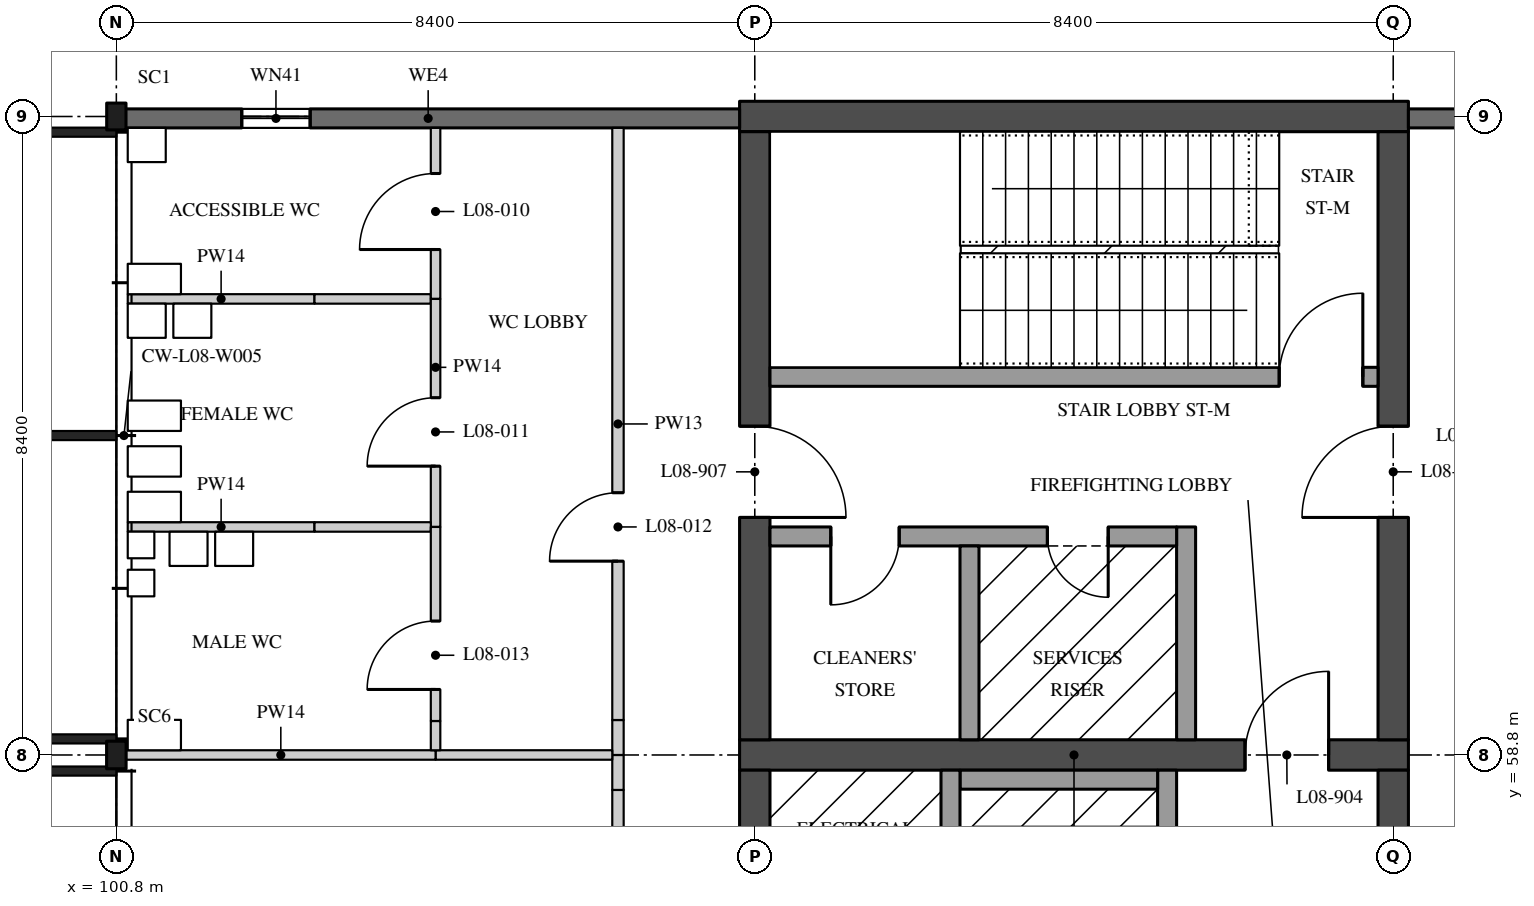
"""IFC4 building model, lengths in metres.
Left out: names, types, materials, properties, quantities, classifications, styles, units other than length and angle.
Written with IfcOpenShell. Run it as: python <this file> out.ifc"""

import sys

from ifc_helpers import new_model, si_unit, direction, frame, frame_2d, origin, origin_2d, place, context, subcontext, project, spatial, rectangle, i_section, extrude, element, fill, save


model = new_model("IFC4")
c1 = context("Model", 3, precision=1e-05, world=origin(), true_north=direction((0.0, 1.0)))
c2 = subcontext(c1, "Body", "Model", "MODEL_VIEW")
j1 = project(units=[si_unit("LENGTHUNIT", "METRE"), si_unit("PLANEANGLEUNIT", "RADIAN")], contexts=[c1])
p1 = place(None, origin())
s1 = spatial("IfcSite", under=j1, at=p1, CompositionType="ELEMENT")
p2 = place(p1, origin())
s2 = spatial("IfcBuilding", under=s1, at=p2, CompositionType="ELEMENT")
p3 = place(p2, frame((0.0, 0.0, 36.9)))
s3 = spatial("IfcBuildingStorey", under=s2, at=p3, CompositionType="ELEMENT", Elevation=36.9)
p4 = place(p3, frame((100.8, 58.8, 0.0), z_axis=(0.0, 0.0, 1.0), x_axis=(1.0, 0.0, 0.0)))
e1 = element("IfcColumn", 1, at=p4, inside=s3, PredefinedType="COLUMN", context=c2, shape_type="SweptSolid", body=[
    extrude(i_section(OverallWidth=0.257, OverallDepth=0.363, WebThickness=0.013, FlangeThickness=0.022, FilletRadius=0.015, at=origin_2d()), origin(), (0.0, 0.0, 1.0), 4.37),
])
p5 = place(p3, frame((100.8, 67.2, 0.0), z_axis=(0.0, 0.0, 1.0), x_axis=(1.0, 0.0, 0.0)))
e2 = element("IfcColumn", 2, at=p5, inside=s3, PredefinedType="COLUMN", context=c2, shape_type="SweptSolid", body=[
    extrude(i_section(OverallWidth=0.254, OverallDepth=0.353, WebThickness=0.01, FlangeThickness=0.016, FilletRadius=0.015, at=origin_2d()), origin(), (0.0, 0.0, 1.0), 4.37),
])
p6 = place(p3, frame((109.0, 58.8, 0.0), z_axis=(0.0, 0.0, 1.0), x_axis=(1.0, 0.0, 0.0)))
e3 = element("IfcWall", 3, at=p6, inside=s3, PredefinedType="SHEAR", context=c2, shape_type="SweptSolid", body=[
    extrude(rectangle(XDim=8.8, YDim=0.4, at=frame_2d((4.4, 0.0))), origin(), (0.0, 0.0, 1.0), 4.37),
])
p7 = place(p6, frame((6.65, 0.0, 0.0)))
e4 = element("IfcOpeningElement", 4, at=p7, cuts=e3, PredefinedType="OPENING", context=c2, shape_type="SweptSolid", body=[
    extrude(rectangle(XDim=1.1, YDim=2.1, at=frame_2d((0.55, 1.05))), frame((0.0, 0.21, 0.0), z_axis=(0.0, -1.0, 0.0), x_axis=(1.0, 0.0, 0.0)), (0.0, 0.0, 1.0), 0.42),
])
p8 = place(p3, frame((109.2, 50.6, 0.0), z_axis=(0.0, 0.0, 1.0), x_axis=(0.0, 1.0, 0.0)))
e5 = element("IfcWall", 5, at=p8, inside=s3, PredefinedType="SHEAR", context=c2, shape_type="SweptSolid", body=[
    extrude(rectangle(XDim=8.0, YDim=0.4, at=frame_2d((4.0, 0.0))), origin(), (0.0, 0.0, 1.0), 4.37),
])
p9 = place(p8, frame((3.25, 0.0, 0.0)))
e6 = element("IfcOpeningElement", 6, at=p9, cuts=e5, PredefinedType="OPENING", context=c2, shape_type="SweptSolid", body=[
    extrude(rectangle(XDim=1.2, YDim=2.1, at=frame_2d((0.6, 1.05))), frame((0.0, 0.21, 0.0), z_axis=(0.0, -1.0, 0.0), x_axis=(1.0, 0.0, 0.0)), (0.0, 0.0, 1.0), 0.42),
])
p10 = place(p3, frame((117.6, 50.6, 0.0), z_axis=(0.0, 0.0, 1.0), x_axis=(0.0, 1.0, 0.0)))
e7 = element("IfcWall", 7, at=p10, inside=s3, PredefinedType="SHEAR", context=c2, shape_type="SweptSolid", body=[
    extrude(rectangle(XDim=8.0, YDim=0.4, at=frame_2d((4.0, 0.0))), origin(), (0.0, 0.0, 1.0), 4.37),
])
p11 = place(p10, frame((3.25, 0.0, 0.0)))
e8 = element("IfcOpeningElement", 8, at=p11, cuts=e7, PredefinedType="OPENING", context=c2, shape_type="SweptSolid", body=[
    extrude(rectangle(XDim=1.2, YDim=2.1, at=frame_2d((0.6, 1.05))), frame((0.0, 0.21, 0.0), z_axis=(0.0, -1.0, 0.0), x_axis=(1.0, 0.0, 0.0)), (0.0, 0.0, 1.0), 0.42),
])
p12 = place(p10, frame((6.0, 0.0, 0.0)))
e9 = element("IfcOpeningElement", 9, at=p12, cuts=e7, PredefinedType="OPENING", context=c2, shape_type="SweptSolid", body=[
    extrude(rectangle(XDim=1.2, YDim=2.1, at=frame_2d((0.6, 1.05))), frame((0.0, 0.21, 0.0), z_axis=(0.0, -1.0, 0.0), x_axis=(1.0, 0.0, 0.0)), (0.0, 0.0, 1.0), 0.42),
])
p13 = place(p3, frame((109.0, 67.2, 0.0), z_axis=(0.0, 0.0, 1.0), x_axis=(1.0, 0.0, 0.0)))
e10 = element("IfcWall", 10, at=p13, inside=s3, PredefinedType="SHEAR", context=c2, shape_type="SweptSolid", body=[
    extrude(rectangle(XDim=8.8, YDim=0.4, at=frame_2d((4.4, 0.0))), origin(), (0.0, 0.0, 1.0), 4.37),
])
p14 = place(p3, frame((109.2, 59.0, 0.0), z_axis=(0.0, 0.0, 1.0), x_axis=(0.0, 1.0, 0.0)))
e11 = element("IfcWall", 11, at=p14, inside=s3, PredefinedType="SHEAR", context=c2, shape_type="SweptSolid", body=[
    extrude(rectangle(XDim=8.0, YDim=0.4, at=frame_2d((4.0, 0.0))), origin(), (0.0, 0.0, 1.0), 4.37),
])
p15 = place(p14, frame((2.925, 0.0, 0.0)))
e12 = element("IfcOpeningElement", 12, at=p15, cuts=e11, PredefinedType="OPENING", context=c2, shape_type="SweptSolid", body=[
    extrude(rectangle(XDim=1.2, YDim=2.1, at=frame_2d((0.6, 1.05))), frame((0.0, 0.21, 0.0), z_axis=(0.0, -1.0, 0.0), x_axis=(1.0, 0.0, 0.0)), (0.0, 0.0, 1.0), 0.42),
])
p16 = place(p3, frame((117.6, 59.0, 0.0), z_axis=(0.0, 0.0, 1.0), x_axis=(0.0, 1.0, 0.0)))
e13 = element("IfcWall", 13, at=p16, inside=s3, PredefinedType="SHEAR", context=c2, shape_type="SweptSolid", body=[
    extrude(rectangle(XDim=8.0, YDim=0.4, at=frame_2d((4.0, 0.0))), origin(), (0.0, 0.0, 1.0), 4.37),
])
p17 = place(p16, frame((2.925, 0.0, 0.0)))
e14 = element("IfcOpeningElement", 14, at=p17, cuts=e13, PredefinedType="OPENING", context=c2, shape_type="SweptSolid", body=[
    extrude(rectangle(XDim=1.2, YDim=2.1, at=frame_2d((0.6, 1.05))), frame((0.0, 0.21, 0.0), z_axis=(0.0, -1.0, 0.0), x_axis=(1.0, 0.0, 0.0)), (0.0, 0.0, 1.0), 0.42),
])
p18 = place(p3, frame((117.4, 63.775, 0.0), z_axis=(0.0, 0.0, 1.0), x_axis=(-1.0, 0.0, 0.0)))
e15 = element("IfcWall", 15, at=p18, inside=s3, PredefinedType="SOLIDWALL", context=c2, shape_type="SweptSolid", body=[
    extrude(rectangle(XDim=8.0, YDim=0.25, at=frame_2d((4.0, 0.0))), origin(), (0.0, 0.0, 1.0), 4.37),
])
p19 = place(p18, frame((0.2, 0.0, 0.0)))
e16 = element("IfcOpeningElement", 16, at=p19, cuts=e15, PredefinedType="OPENING", context=c2, shape_type="SweptSolid", body=[
    extrude(rectangle(XDim=1.1, YDim=2.1, at=frame_2d((0.55, 1.05))), frame((0.0, 0.135, 0.0), z_axis=(0.0, -1.0, 0.0), x_axis=(1.0, 0.0, 0.0)), (0.0, 0.0, 1.0), 0.27),
])
p20 = place(p3, frame((114.875, 61.8, 0.0), z_axis=(0.0, 0.0, 1.0), x_axis=(0.0, -1.0, 0.0)))
e17 = element("IfcWall", 17, at=p20, inside=s3, PredefinedType="SOLIDWALL", context=c2, shape_type="SweptSolid", body=[
    extrude(rectangle(XDim=2.8, YDim=0.25, at=frame_2d((1.4, 0.0))), origin(), (0.0, 0.0, 1.0), 4.37),
])
p21 = place(p3, frame((114.75, 61.675, 0.0), z_axis=(0.0, 0.0, 1.0), x_axis=(-1.0, 0.0, 0.0)))
e18 = element("IfcWall", 18, at=p21, inside=s3, PredefinedType="SOLIDWALL", context=c2, shape_type="SweptSolid", body=[
    extrude(rectangle(XDim=5.35, YDim=0.25, at=frame_2d((2.675, 0.0))), origin(), (0.0, 0.0, 1.0), 4.37),
])
p22 = place(p21, frame((3.65, 0.0, 0.0)))
e19 = element("IfcOpeningElement", 19, at=p22, cuts=e18, PredefinedType="OPENING", context=c2, shape_type="SweptSolid", body=[
    extrude(rectangle(XDim=0.9, YDim=2.1, at=frame_2d((0.45, 1.05))), frame((0.0, 0.135, 0.0), z_axis=(0.0, -1.0, 0.0), x_axis=(1.0, 0.0, 0.0)), (0.0, 0.0, 1.0), 0.27),
])
p23 = place(p21, frame((0.9, 0.0, 0.0)))
e20 = element("IfcOpeningElement", 20, at=p23, cuts=e18, PredefinedType="OPENING", context=c2, shape_type="SweptSolid", body=[
    extrude(rectangle(XDim=0.8, YDim=2.1, at=frame_2d((0.4, 1.05))), frame((0.0, 0.135, 0.0), z_axis=(0.0, -1.0, 0.0), x_axis=(1.0, 0.0, 0.0)), (0.0, 0.0, 1.0), 0.27),
])
p24 = place(p3, frame((112.025, 61.55, 0.0), z_axis=(0.0, 0.0, 1.0), x_axis=(0.0, -1.0, 0.0)))
e21 = element("IfcWall", 21, at=p24, inside=s3, PredefinedType="SOLIDWALL", context=c2, shape_type="SweptSolid", body=[
    extrude(rectangle(XDim=2.55, YDim=0.25, at=frame_2d((1.275, 0.0))), origin(), (0.0, 0.0, 1.0), 4.37),
])
p25 = place(p3, frame((114.625, 55.5, 0.0), z_axis=(0.0, 0.0, 1.0), x_axis=(0.0, 1.0, 0.0)))
e22 = element("IfcWall", 22, at=p25, inside=s3, PredefinedType="SOLIDWALL", context=c2, shape_type="SweptSolid", body=[
    extrude(rectangle(XDim=3.1, YDim=0.25, at=frame_2d((1.55, 0.0))), origin(), (0.0, 0.0, 1.0), 4.37),
])
p26 = place(p25, frame((1.0, 0.0, 0.0)))
e23 = element("IfcOpeningElement", 23, at=p26, cuts=e22, PredefinedType="OPENING", context=c2, shape_type="SweptSolid", body=[
    extrude(rectangle(XDim=1.1, YDim=2.1, at=frame_2d((0.55, 1.05))), frame((0.0, 0.135, 0.0), z_axis=(0.0, -1.0, 0.0), x_axis=(1.0, 0.0, 0.0)), (0.0, 0.0, 1.0), 0.27),
])
p27 = place(p3, frame((111.9, 58.475, 0.0), z_axis=(0.0, 0.0, 1.0), x_axis=(1.0, 0.0, 0.0)))
e24 = element("IfcWall", 24, at=p27, inside=s3, PredefinedType="SOLIDWALL", context=c2, shape_type="SweptSolid", body=[
    extrude(rectangle(XDim=2.6, YDim=0.25, at=frame_2d((1.3, 0.0))), origin(), (0.0, 0.0, 1.0), 4.37),
])
p28 = place(p3, frame((111.775, 55.5, 0.0), z_axis=(0.0, 0.0, 1.0), x_axis=(0.0, 1.0, 0.0)))
e25 = element("IfcWall", 25, at=p28, inside=s3, PredefinedType="SOLIDWALL", context=c2, shape_type="SweptSolid", body=[
    extrude(rectangle(XDim=3.1, YDim=0.25, at=frame_2d((1.55, 0.0))), origin(), (0.0, 0.0, 1.0), 4.37),
])
p29 = place(p3, frame((107.4, 50.86, 0.0), z_axis=(0.0, 0.0, 1.0), x_axis=(0.0, 1.0, 0.0)))
e26 = element("IfcWall", 26, at=p29, inside=s3, PredefinedType="PARTITIONING", context=c2, shape_type="SweptSolid", body=[
    extrude(rectangle(XDim=7.48, YDim=0.15, at=frame_2d((3.74, 0.0))), origin(), (0.0, 0.0, 1.0), 4.37),
])
p30 = place(p29, frame((3.29, 0.0, 0.0)))
e27 = element("IfcOpeningElement", 27, at=p30, cuts=e26, PredefinedType="OPENING", context=c2, shape_type="SweptSolid", body=[
    extrude(rectangle(XDim=0.9, YDim=2.1, at=frame_2d((0.45, 1.05))), frame((0.0, 0.085, 0.0), z_axis=(0.0, -1.0, 0.0), x_axis=(1.0, 0.0, 0.0)), (0.0, 0.0, 1.0), 0.17),
])
for number, where, z_axis, x_axis in (
    (28, (107.4, 58.34, 0.0), (0.0, 0.0, 1.0), (0.0, 1.0, 0.0)),
    (29, (107.4, 58.8, 0.0), (0.0, 0.0, 1.0), (0.0, 1.0, 0.0)),
):
    element("IfcWall", number, at=place(p3, frame(where, z_axis=z_axis, x_axis=x_axis)), inside=s3, PredefinedType="PARTITIONING", context=c2, shape_type="SweptSolid", body=[
        extrude(rectangle(XDim=0.46, YDim=0.15, at=frame_2d((0.23, 0.0))), origin(), (0.0, 0.0, 1.0), 3.817),
    ])
p31 = place(p3, frame((107.4, 59.26, 0.0), z_axis=(0.0, 0.0, 1.0), x_axis=(0.0, 1.0, 0.0)))
e30 = element("IfcWall", 30, at=p31, inside=s3, PredefinedType="PARTITIONING", context=c2, shape_type="SweptSolid", body=[
    extrude(rectangle(XDim=7.79, YDim=0.15, at=frame_2d((3.895, 0.0))), origin(), (0.0, 0.0, 1.0), 4.37),
])
p32 = place(p31, frame((2.09, 0.0, 0.0)))
e31 = element("IfcOpeningElement", 31, at=p32, cuts=e30, PredefinedType="OPENING", context=c2, shape_type="SweptSolid", body=[
    extrude(rectangle(XDim=0.9, YDim=2.1, at=frame_2d((0.45, 1.05))), frame((0.0, 0.085, 0.0), z_axis=(0.0, -1.0, 0.0), x_axis=(1.0, 0.0, 0.0)), (0.0, 0.0, 1.0), 0.17),
])
p33 = place(p3, frame((105.0, 58.8, 0.0), z_axis=(0.0, 0.0, 1.0), x_axis=(1.0, 0.0, 0.0)))
e32 = element("IfcWall", 32, at=p33, inside=s3, PredefinedType="PARTITIONING", context=c2, shape_type="SweptSolid", body=[
    extrude(rectangle(XDim=2.325, YDim=0.125, at=frame_2d((1.163, 0.0))), origin(), (0.0, 0.0, 1.0), 3.817),
])
p34 = place(p3, frame((100.928, 58.8, 0.0), z_axis=(0.0, 0.0, 1.0), x_axis=(1.0, 0.0, 0.0)))
e33 = element("IfcWall", 33, at=p34, inside=s3, PredefinedType="PARTITIONING", context=c2, shape_type="SweptSolid", body=[
    extrude(rectangle(XDim=4.072, YDim=0.125, at=frame_2d((2.036, 0.0))), origin(), (0.0, 0.0, 1.0), 3.817),
])
p35 = place(p3, frame((100.95, 64.8, 0.0), z_axis=(0.0, 0.0, 1.0), x_axis=(1.0, 0.0, 0.0)))
e34 = element("IfcWall", 34, at=p35, inside=s3, PredefinedType="PARTITIONING", context=c2, shape_type="SweptSolid", body=[
    extrude(rectangle(XDim=2.457, YDim=0.125, at=frame_2d((1.229, 0.0))), origin(), (0.0, 0.0, 1.0), 4.37),
])
p36 = place(p3, frame((103.407, 64.8, 0.0), z_axis=(0.0, 0.0, 1.0), x_axis=(1.0, 0.0, 0.0)))
e35 = element("IfcWall", 35, at=p36, inside=s3, PredefinedType="PARTITIONING", context=c2, shape_type="SweptSolid", body=[
    extrude(rectangle(XDim=1.531, YDim=0.125, at=frame_2d((0.766, 0.0))), origin(), (0.0, 0.0, 1.0), 3.946),
])
p37 = place(p3, frame((105.0, 64.8, 0.0), z_axis=(0.0, 0.0, 1.0), x_axis=(0.0, 1.0, 0.0)))
e36 = element("IfcWall", 36, at=p37, inside=s3, PredefinedType="PARTITIONING", context=c2, shape_type="SweptSolid", body=[
    extrude(rectangle(XDim=2.25, YDim=0.125, at=frame_2d((1.125, 0.0))), origin(), (0.0, 0.0, 1.0), 4.37),
])
p38 = place(p37, frame((0.65, 0.0, 0.0)))
e37 = element("IfcOpeningElement", 37, at=p38, cuts=e36, PredefinedType="OPENING", context=c2, shape_type="SweptSolid", body=[
    extrude(rectangle(XDim=1.0, YDim=2.1, at=frame_2d((0.5, 1.05))), frame((0.0, 0.073, 0.0), z_axis=(0.0, -1.0, 0.0), x_axis=(1.0, 0.0, 0.0)), (0.0, 0.0, 1.0), 0.145),
])
p39 = place(p3, frame((105.0, 61.8, 0.0), z_axis=(0.0, 0.0, 1.0), x_axis=(0.0, 1.0, 0.0)))
e38 = element("IfcWall", 38, at=p39, inside=s3, PredefinedType="PARTITIONING", context=c2, shape_type="SweptSolid", body=[
    extrude(rectangle(XDim=3.0, YDim=0.125, at=frame_2d((1.5, 0.0))), origin(), (0.0, 0.0, 1.0), 4.37),
])
p40 = place(p39, frame((0.8, 0.0, 0.0)))
e39 = element("IfcOpeningElement", 39, at=p40, cuts=e38, PredefinedType="OPENING", context=c2, shape_type="SweptSolid", body=[
    extrude(rectangle(XDim=0.9, YDim=2.1, at=frame_2d((0.45, 1.05))), frame((0.0, 0.073, 0.0), z_axis=(0.0, -1.0, 0.0), x_axis=(1.0, 0.0, 0.0)), (0.0, 0.0, 1.0), 0.145),
])
p41 = place(p3, frame((100.95, 61.8, 0.0), z_axis=(0.0, 0.0, 1.0), x_axis=(1.0, 0.0, 0.0)))
e40 = element("IfcWall", 40, at=p41, inside=s3, PredefinedType="PARTITIONING", context=c2, shape_type="SweptSolid", body=[
    extrude(rectangle(XDim=2.457, YDim=0.125, at=frame_2d((1.229, 0.0))), origin(), (0.0, 0.0, 1.0), 4.37),
])
p42 = place(p3, frame((103.407, 61.8, 0.0), z_axis=(0.0, 0.0, 1.0), x_axis=(1.0, 0.0, 0.0)))
e41 = element("IfcWall", 41, at=p42, inside=s3, PredefinedType="PARTITIONING", context=c2, shape_type="SweptSolid", body=[
    extrude(rectangle(XDim=1.531, YDim=0.125, at=frame_2d((0.766, 0.0))), origin(), (0.0, 0.0, 1.0), 3.946),
])
p43 = place(p3, frame((105.0, 58.862, 0.0), z_axis=(0.0, 0.0, 1.0), x_axis=(0.0, 1.0, 0.0)))
e42 = element("IfcWall", 42, at=p43, inside=s3, PredefinedType="PARTITIONING", context=c2, shape_type="SweptSolid", body=[
    extrude(rectangle(XDim=0.385, YDim=0.125, at=frame_2d((0.192, 0.0))), origin(), (0.0, 0.0, 1.0), 3.817),
])
p44 = place(p3, frame((105.0, 59.247, 0.0), z_axis=(0.0, 0.0, 1.0), x_axis=(0.0, 1.0, 0.0)))
e43 = element("IfcWall", 43, at=p44, inside=s3, PredefinedType="PARTITIONING", context=c2, shape_type="SweptSolid", body=[
    extrude(rectangle(XDim=2.553, YDim=0.125, at=frame_2d((1.276, 0.0))), origin(), (0.0, 0.0, 1.0), 4.37),
])
p45 = place(p44, frame((0.415, 0.0, 0.0)))
e44 = element("IfcOpeningElement", 44, at=p45, cuts=e43, PredefinedType="OPENING", context=c2, shape_type="SweptSolid", body=[
    extrude(rectangle(XDim=0.9, YDim=2.1, at=frame_2d((0.45, 1.05))), frame((0.0, 0.073, 0.0), z_axis=(0.0, -1.0, 0.0), x_axis=(1.0, 0.0, 0.0)), (0.0, 0.0, 1.0), 0.145),
])
p46 = place(p3, frame((125.995, 67.175, 0.0), z_axis=(0.0, 0.0, 1.0), x_axis=(-1.0, 0.0, 0.0)))
e45 = element("IfcWall", 45, at=p46, inside=s3, PredefinedType="SOLIDWALL", context=c2, shape_type="SweptSolid", body=[
    extrude(rectangle(XDim=8.195, YDim=0.25, at=frame_2d((4.097, 0.0))), origin(), (0.0, 0.0, 1.0), 3.819),
])
p47 = place(p46, frame((1.195, 0.0, 0.6)))
e46 = element("IfcOpeningElement", 46, at=p47, cuts=e45, PredefinedType="OPENING", context=c2, shape_type="SweptSolid", body=[
    extrude(rectangle(XDim=1.8, YDim=2.7, at=frame_2d((0.9, 1.35))), frame((0.0, 0.135, 0.0), z_axis=(0.0, -1.0, 0.0), x_axis=(1.0, 0.0, 0.0)), (0.0, 0.0, 1.0), 0.27),
])
p48 = place(p3, frame((109.0, 67.175, 0.0), z_axis=(0.0, 0.0, 1.0), x_axis=(-1.0, 0.0, 0.0)))
e47 = element("IfcWall", 47, at=p48, inside=s3, PredefinedType="SOLIDWALL", context=c2, shape_type="SweptSolid", body=[
    extrude(rectangle(XDim=8.195, YDim=0.25, at=frame_2d((4.097, 0.0))), origin(), (0.0, 0.0, 1.0), 3.819),
])
p49 = place(p48, frame((5.65, 0.0, 1.5)))
e48 = element("IfcOpeningElement", 48, at=p49, cuts=e47, PredefinedType="OPENING", context=c2, shape_type="SweptSolid", body=[
    extrude(rectangle(XDim=0.9, YDim=1.2, at=frame_2d((0.45, 0.6))), frame((0.0, 0.135, 0.0), z_axis=(0.0, -1.0, 0.0), x_axis=(1.0, 0.0, 0.0)), (0.0, 0.0, 1.0), 0.27),
])
p50 = place(p7, origin())
e49 = element("IfcDoor", 49, at=p50, inside=s3, OperationType="SINGLE_SWING_LEFT", PredefinedType="DOOR", context=c2, shape_type="SweptSolid", body=[
    extrude(rectangle(XDim=1.1, YDim=2.1, at=frame_2d((0.55, 1.05))), frame((0.0, 0.035, 0.0), z_axis=(0.0, -1.0, 0.0), x_axis=(1.0, 0.0, 0.0)), (0.0, 0.0, 1.0), 0.07),
])
fill(e4, e49)
p51 = place(p22, origin())
e50 = element("IfcDoor", 50, at=p51, inside=s3, OperationType="SINGLE_SWING_LEFT", PredefinedType="DOOR", context=c2, shape_type="SweptSolid", body=[
    extrude(rectangle(XDim=0.9, YDim=2.1, at=frame_2d((0.45, 1.05))), frame((0.0, 0.035, 0.0), z_axis=(0.0, -1.0, 0.0), x_axis=(1.0, 0.0, 0.0)), (0.0, 0.0, 1.0), 0.07),
])
fill(e19, e50)
p52 = place(p15, frame((1.2, 0.0, 0.0), z_axis=(0.0, 0.0, 1.0), x_axis=(-1.0, 0.0, 0.0)))
e51 = element("IfcDoor", 51, at=p52, inside=s3, OperationType="SINGLE_SWING_LEFT", PredefinedType="DOOR", context=c2, shape_type="SweptSolid", body=[
    extrude(rectangle(XDim=1.2, YDim=2.1, at=frame_2d((0.6, 1.05))), frame((0.0, 0.035, 0.0), z_axis=(0.0, -1.0, 0.0), x_axis=(1.0, 0.0, 0.0)), (0.0, 0.0, 1.0), 0.07),
])
fill(e12, e51)
p53 = place(p17, origin())
e52 = element("IfcDoor", 52, at=p53, inside=s3, OperationType="SINGLE_SWING_RIGHT", PredefinedType="DOOR", context=c2, shape_type="SweptSolid", body=[
    extrude(rectangle(XDim=1.2, YDim=2.1, at=frame_2d((0.6, 1.05))), frame((0.0, 0.035, 0.0), z_axis=(0.0, -1.0, 0.0), x_axis=(1.0, 0.0, 0.0)), (0.0, 0.0, 1.0), 0.07),
])
fill(e14, e52)
p54 = place(p23, origin())
e53 = element("IfcDoor", 53, at=p54, inside=s3, OperationType="SINGLE_SWING_RIGHT", PredefinedType="DOOR", context=c2, shape_type="SweptSolid", body=[
    extrude(rectangle(XDim=0.8, YDim=2.1, at=frame_2d((0.4, 1.05))), frame((0.0, 0.035, 0.0), z_axis=(0.0, -1.0, 0.0), x_axis=(1.0, 0.0, 0.0)), (0.0, 0.0, 1.0), 0.07),
])
fill(e20, e53)
p55 = place(p19, frame((1.1, 0.0, 0.0), z_axis=(0.0, 0.0, 1.0), x_axis=(-1.0, 0.0, 0.0)))
e54 = element("IfcDoor", 54, at=p55, inside=s3, OperationType="SINGLE_SWING_LEFT", PredefinedType="DOOR", context=c2, shape_type="SweptSolid", body=[
    extrude(rectangle(XDim=1.1, YDim=2.1, at=frame_2d((0.55, 1.05))), frame((0.0, 0.035, 0.0), z_axis=(0.0, -1.0, 0.0), x_axis=(1.0, 0.0, 0.0)), (0.0, 0.0, 1.0), 0.07),
])
fill(e16, e54)
p56 = place(p38, origin())
e55 = element("IfcDoor", 55, at=p56, inside=s3, OperationType="SINGLE_SWING_RIGHT", PredefinedType="DOOR", context=c2, shape_type="SweptSolid", body=[
    extrude(rectangle(XDim=1.0, YDim=2.1, at=frame_2d((0.5, 1.05))), frame((0.0, 0.02, 0.0), z_axis=(0.0, -1.0, 0.0), x_axis=(1.0, 0.0, 0.0)), (0.0, 0.0, 1.0), 0.04),
])
fill(e37, e55)
p57 = place(p40, origin())
e56 = element("IfcDoor", 56, at=p57, inside=s3, OperationType="SINGLE_SWING_RIGHT", PredefinedType="DOOR", context=c2, shape_type="SweptSolid", body=[
    extrude(rectangle(XDim=0.9, YDim=2.1, at=frame_2d((0.45, 1.05))), frame((0.0, 0.02, 0.0), z_axis=(0.0, -1.0, 0.0), x_axis=(1.0, 0.0, 0.0)), (0.0, 0.0, 1.0), 0.04),
])
fill(e39, e56)
p58 = place(p32, origin())
e57 = element("IfcDoor", 57, at=p58, inside=s3, OperationType="SINGLE_SWING_RIGHT", PredefinedType="DOOR", context=c2, shape_type="SweptSolid", body=[
    extrude(rectangle(XDim=0.9, YDim=2.1, at=frame_2d((0.45, 1.05))), frame((0.0, 0.025, 0.0), z_axis=(0.0, -1.0, 0.0), x_axis=(1.0, 0.0, 0.0)), (0.0, 0.0, 1.0), 0.05),
])
fill(e31, e57)
p59 = place(p45, origin())
e58 = element("IfcDoor", 58, at=p59, inside=s3, OperationType="SINGLE_SWING_RIGHT", PredefinedType="DOOR", context=c2, shape_type="SweptSolid", body=[
    extrude(rectangle(XDim=0.9, YDim=2.1, at=frame_2d((0.45, 1.05))), frame((0.0, 0.02, 0.0), z_axis=(0.0, -1.0, 0.0), x_axis=(1.0, 0.0, 0.0)), (0.0, 0.0, 1.0), 0.04),
])
fill(e44, e58)
p60 = place(p49, origin())
e59 = element("IfcWindow", 59, at=p60, inside=s3, PartitioningType="SINGLE_PANEL", PredefinedType="WINDOW", context=c2, shape_type="SweptSolid", body=[
    extrude(rectangle(XDim=0.9, YDim=1.2, at=frame_2d((0.45, 0.6))), frame((0.0, 0.03, 0.0), z_axis=(0.0, -1.0, 0.0), x_axis=(1.0, 0.0, 0.0)), (0.0, 0.0, 1.0), 0.06),
])
fill(e48, e59)
save(model, sys.argv[1])
